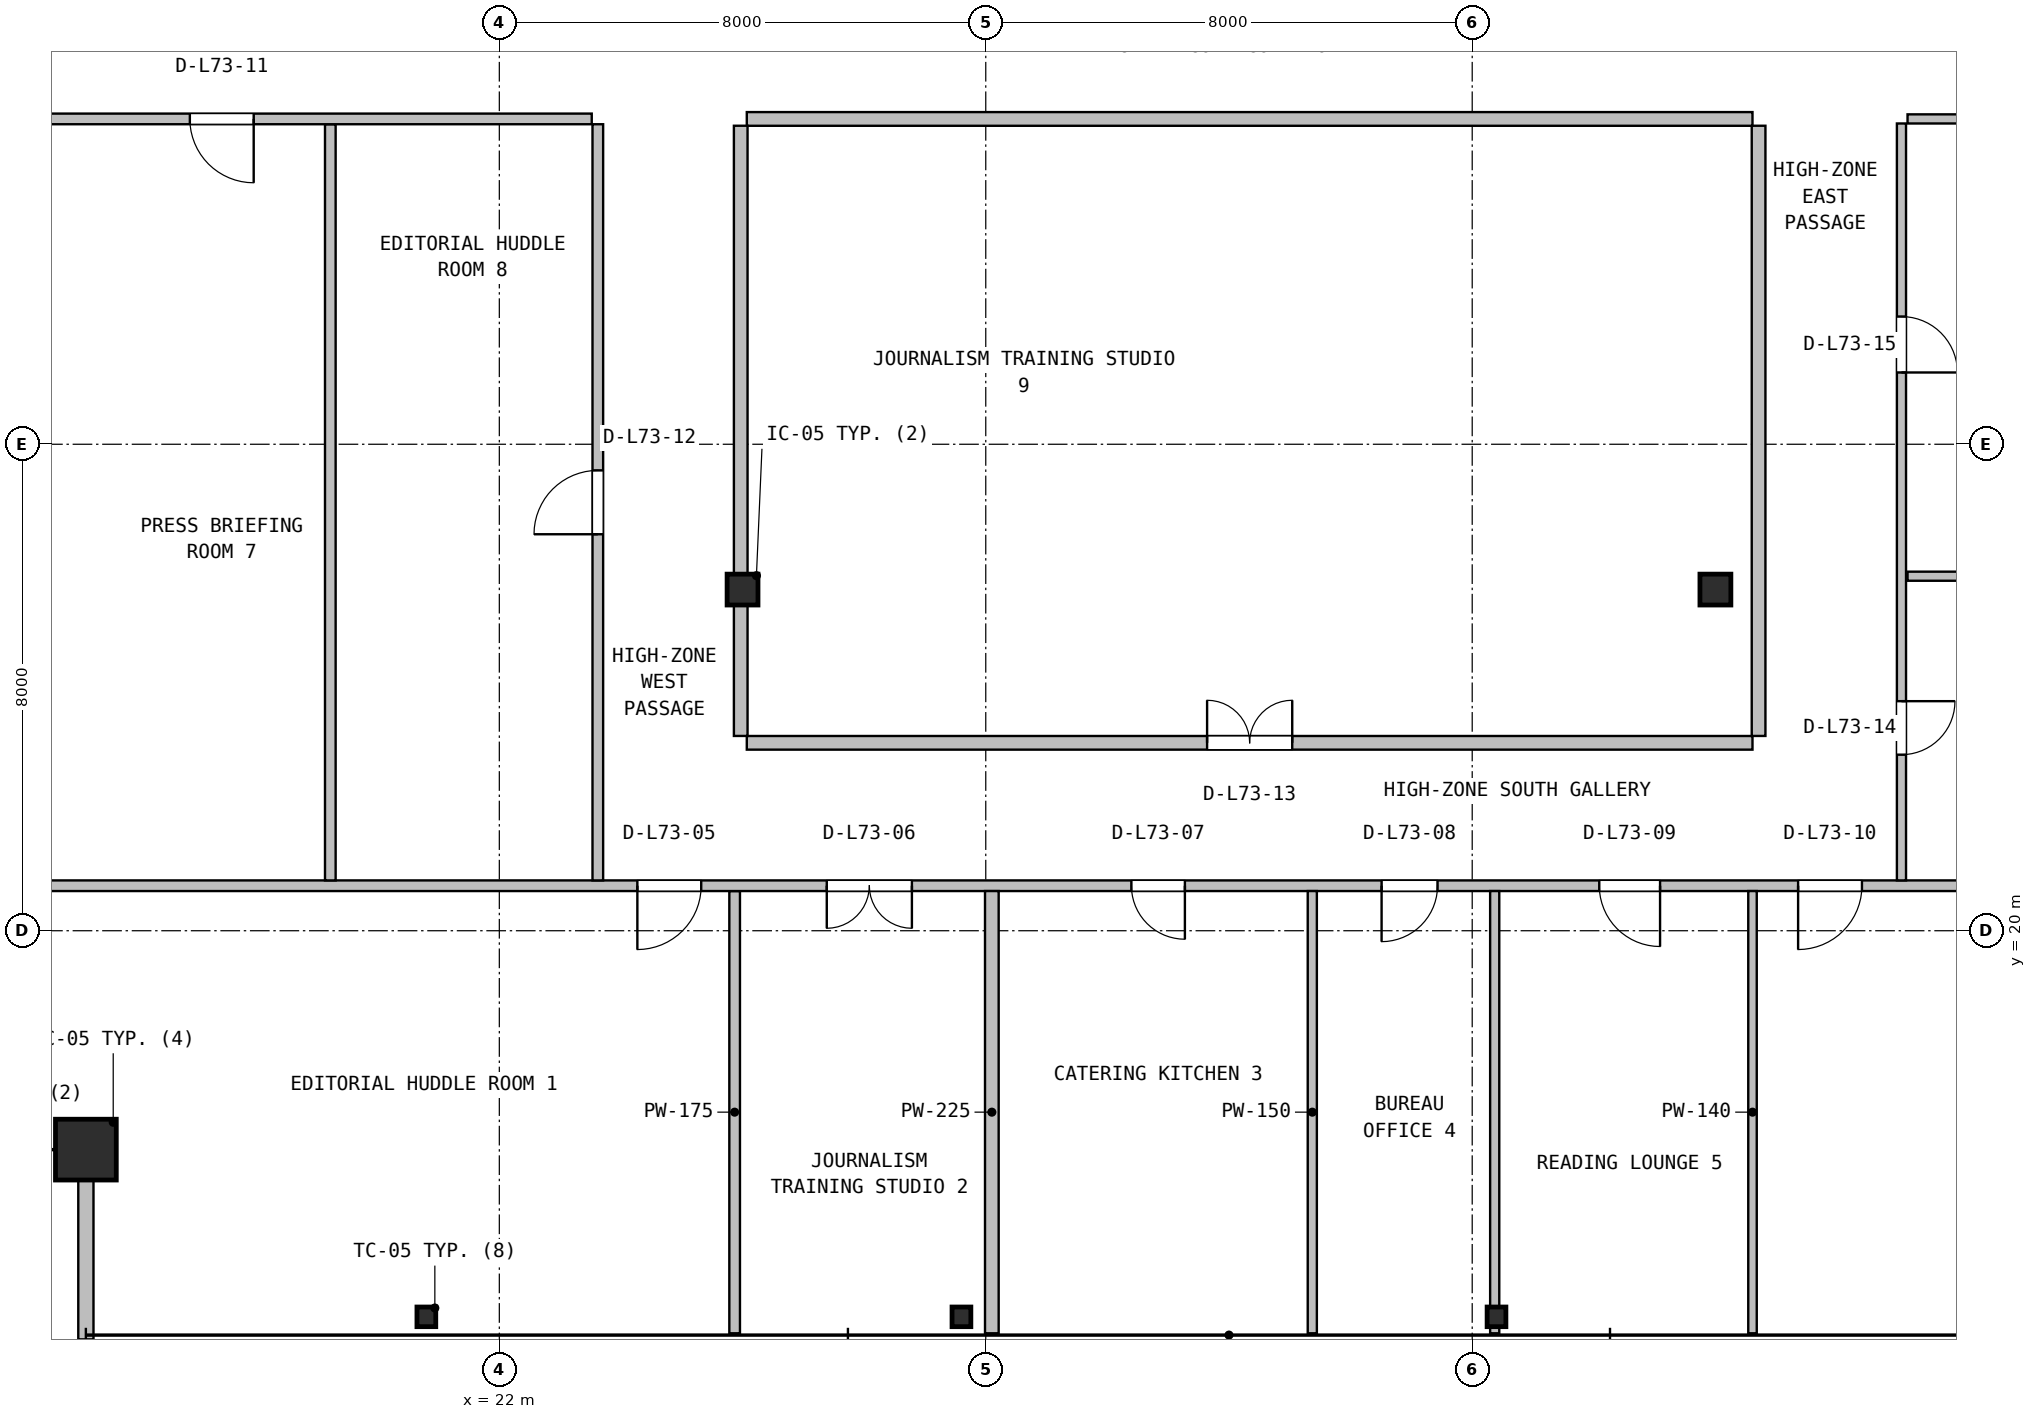
"""IFC4 building model, lengths in metres.
Left out: names, types, materials, properties, quantities, classifications, styles, units other than length and angle.
Written with IfcOpenShell. Run it as: python <this file> out.ifc"""

import sys

from ifc_helpers import new_model, si_unit, direction, frame, frame_2d, origin, origin_2d, place, context, subcontext, project, spatial, rectangle, hollow_rectangle, hollow_circle, i_section, extrude, source, transform, mapped, element, fill, save


model = new_model("IFC4")
c1 = context("Model", 3, precision=1e-05, world=origin(), true_north=direction((0.0, 1.0)))
c2 = subcontext(c1, "Body", "Model", "MODEL_VIEW")
j1 = project(units=[si_unit("LENGTHUNIT", "METRE"), si_unit("PLANEANGLEUNIT", "RADIAN")], contexts=[c1])
p1 = place(None, origin())
s1 = spatial("IfcSite", under=j1, at=p1, CompositionType="ELEMENT")
p2 = place(p1, origin())
s2 = spatial("IfcBuilding", under=s1, at=p2, CompositionType="ELEMENT")
p3 = place(p2, frame((0.0, 0.0, 292.6)))
s3 = spatial("IfcBuildingStorey", under=s2, at=p3, CompositionType="ELEMENT", Elevation=292.6)
m1 = source(origin(), c2, "Body", "SweptSolid", [
    extrude(hollow_rectangle(XDim=1.0, YDim=1.0, WallThickness=0.04, at=origin_2d()), origin(), (0.0, 0.0, 1.0), 3.8),
])
p4 = place(p3, frame((15.2, 16.4, 0.0), z_axis=(0.0, 0.0, 1.0), x_axis=(1.0, 0.0, 0.0)))
e1 = element("IfcColumn", 1, at=p4, inside=s3, PredefinedType="COLUMN", context=c2, shape_type="MappedRepresentation", body=[
    mapped(m1, transform((0.0, 0.0, 0.0), x_axis=(1.0, 0.0, 0.0), y_axis=(0.0, 1.0, 0.0), z_axis=(0.0, 0.0, 1.0), scale=1.0)),
])
m2 = source(origin(), c2, "Body", "SweptSolid", [
    extrude(i_section(OverallWidth=0.309, OverallDepth=0.323, WebThickness=0.014, FlangeThickness=0.023, FilletRadius=0.015, at=origin_2d()), origin(), (0.0, 0.0, 1.0), 3.8),
])
for number, where, z_axis, x_axis in (
    (2, (20.8, 13.65, 0.0), (0.0, 0.0, 1.0), (1.0, 0.0, 0.0)),
    (3, (29.6, 13.65, 0.0), (0.0, 0.0, 1.0), (1.0, 0.0, 0.0)),
    (4, (38.4, 13.65, 0.0), (0.0, 0.0, 1.0), (1.0, 0.0, 0.0)),
):
    element("IfcColumn", number, at=place(p3, frame(where, z_axis=z_axis, x_axis=x_axis)), inside=s3, PredefinedType="COLUMN", context=c2, shape_type="MappedRepresentation", body=[
        mapped(m2, transform((0.0, 0.0, 0.0), x_axis=(1.0, 0.0, 0.0), y_axis=(0.0, 1.0, 0.0), z_axis=(0.0, 0.0, 1.0), scale=1.0)),
    ])
m3 = source(origin(), c2, "Body", "SweptSolid", [
    extrude(hollow_circle(Radius=0.254, WallThickness=0.02, at=origin_2d()), origin(), (0.0, 0.0, 1.0), 3.8),
])
for number, where, z_axis, x_axis in (
    (5, (26.0, 25.61, 0.0), (0.0, 0.0, 1.0), (1.0, 0.0, 0.0)),
    (6, (42.0, 25.61, 0.0), (0.0, 0.0, 1.0), (1.0, 0.0, 0.0)),
):
    element("IfcColumn", number, at=place(p3, frame(where, z_axis=z_axis, x_axis=x_axis)), inside=s3, PredefinedType="COLUMN", context=c2, shape_type="MappedRepresentation", body=[
        mapped(m3, transform((0.0, 0.0, 0.0), x_axis=(1.0, 0.0, 0.0), y_axis=(0.0, 1.0, 0.0), z_axis=(0.0, 0.0, 1.0), scale=1.0)),
    ])
p5 = place(p3, frame((15.2, 13.28, 0.0), z_axis=(0.0, 0.0, 1.0), x_axis=(0.0, 1.0, 0.0)))
e7 = element("IfcWall", 7, at=p5, inside=s3, PredefinedType="SOLIDWALL", context=c2, shape_type="SweptSolid", body=[
    extrude(rectangle(XDim=3.2, YDim=0.25, at=frame_2d((1.6, 0.0))), origin(), (0.0, 0.0, 1.0), 3.171),
])
p6 = place(p3, frame((25.87, 13.38, 0.0), z_axis=(0.0, 0.0, 1.0), x_axis=(0.0, 1.0, 0.0)))
e8 = element("IfcWall", 8, at=p6, inside=s3, PredefinedType="PARTITIONING", context=c2, shape_type="SweptSolid", body=[
    extrude(rectangle(XDim=7.272, YDim=0.175, at=frame_2d((3.636, 0.0))), origin(), (0.0, 0.0, 1.0), 2.981),
])
p7 = place(p3, frame((12.18, 20.74, 0.0), z_axis=(0.0, 0.0, 1.0), x_axis=(1.0, 0.0, 0.0)))
e9 = element("IfcWall", 9, at=p7, inside=s3, PredefinedType="PARTITIONING", context=c2, shape_type="SweptSolid", body=[
    extrude(rectangle(XDim=43.64, YDim=0.175, at=frame_2d((21.82, 0.0))), origin(), (0.0, 0.0, 1.0), 2.981),
])
p8 = place(p7, frame((12.09, 0.0, 0.0)))
e10 = element("IfcOpeningElement", 10, at=p8, cuts=e9, PredefinedType="OPENING", context=c2, shape_type="SweptSolid", body=[
    extrude(rectangle(XDim=1.05, YDim=2.1, at=frame_2d((0.525, 1.05))), frame((0.0, 0.098, 0.0), z_axis=(0.0, -1.0, 0.0), x_axis=(1.0, 0.0, 0.0)), (0.0, 0.0, 1.0), 0.195),
])
p9 = place(p7, frame((15.205, 0.0, 0.0)))
e11 = element("IfcOpeningElement", 11, at=p9, cuts=e9, PredefinedType="OPENING", context=c2, shape_type="SweptSolid", body=[
    extrude(rectangle(XDim=1.4, YDim=2.12, at=frame_2d((0.7, 1.06))), frame((0.0, 0.098, 0.0), z_axis=(0.0, -1.0, 0.0), x_axis=(1.0, 0.0, 0.0)), (0.0, 0.0, 1.0), 0.195),
])
p10 = place(p7, frame((20.215, 0.0, 0.0)))
e12 = element("IfcOpeningElement", 12, at=p10, cuts=e9, PredefinedType="OPENING", context=c2, shape_type="SweptSolid", body=[
    extrude(rectangle(XDim=0.88, YDim=2.06, at=frame_2d((0.44, 1.03))), frame((0.0, 0.098, 0.0), z_axis=(0.0, -1.0, 0.0), x_axis=(1.0, 0.0, 0.0)), (0.0, 0.0, 1.0), 0.195),
])
p11 = place(p7, frame((24.33, 0.0, 0.0)))
e13 = element("IfcOpeningElement", 13, at=p11, cuts=e9, PredefinedType="OPENING", context=c2, shape_type="SweptSolid", body=[
    extrude(rectangle(XDim=0.92, YDim=2.08, at=frame_2d((0.46, 1.04))), frame((0.0, 0.098, 0.0), z_axis=(0.0, -1.0, 0.0), x_axis=(1.0, 0.0, 0.0)), (0.0, 0.0, 1.0), 0.195),
])
p12 = place(p7, frame((27.91, 0.0, 0.0)))
e14 = element("IfcOpeningElement", 14, at=p12, cuts=e9, PredefinedType="OPENING", context=c2, shape_type="SweptSolid", body=[
    extrude(rectangle(XDim=1.0, YDim=2.1, at=frame_2d((0.5, 1.05))), frame((0.0, 0.098, 0.0), z_axis=(0.0, -1.0, 0.0), x_axis=(1.0, 0.0, 0.0)), (0.0, 0.0, 1.0), 0.195),
])
p13 = place(p7, frame((31.18, 0.0, 0.0)))
e15 = element("IfcOpeningElement", 15, at=p13, cuts=e9, PredefinedType="OPENING", context=c2, shape_type="SweptSolid", body=[
    extrude(rectangle(XDim=1.05, YDim=2.1, at=frame_2d((0.525, 1.05))), frame((0.0, 0.098, 0.0), z_axis=(0.0, -1.0, 0.0), x_axis=(1.0, 0.0, 0.0)), (0.0, 0.0, 1.0), 0.195),
])
p14 = place(p3, frame((30.1, 13.38, 0.0), z_axis=(0.0, 0.0, 1.0), x_axis=(0.0, 1.0, 0.0)))
e16 = element("IfcWall", 16, at=p14, inside=s3, PredefinedType="PARTITIONING", context=c2, shape_type="SweptSolid", body=[
    extrude(rectangle(XDim=7.272, YDim=0.225, at=frame_2d((3.636, 0.0))), origin(), (0.0, 0.0, 1.0), 3.171),
])
p15 = place(p3, frame((35.37, 13.38, 0.0), z_axis=(0.0, 0.0, 1.0), x_axis=(0.0, 1.0, 0.0)))
e17 = element("IfcWall", 17, at=p15, inside=s3, PredefinedType="PARTITIONING", context=c2, shape_type="SweptSolid", body=[
    extrude(rectangle(XDim=7.272, YDim=0.15, at=frame_2d((3.636, 0.0))), origin(), (0.0, 0.0, 1.0), 3.171),
])
p16 = place(p3, frame((38.37, 13.38, 0.0), z_axis=(0.0, 0.0, 1.0), x_axis=(0.0, 1.0, 0.0)))
e18 = element("IfcWall", 18, at=p16, inside=s3, PredefinedType="PARTITIONING", context=c2, shape_type="SweptSolid", body=[
    extrude(rectangle(XDim=7.272, YDim=0.15, at=frame_2d((3.636, 0.0))), origin(), (0.0, 0.0, 1.0), 2.981),
])
p17 = place(p3, frame((42.61, 13.38, 0.0), z_axis=(0.0, 0.0, 1.0), x_axis=(0.0, 1.0, 0.0)))
e19 = element("IfcWall", 19, at=p17, inside=s3, PredefinedType="PARTITIONING", context=c2, shape_type="SweptSolid", body=[
    extrude(rectangle(XDim=7.272, YDim=0.14, at=frame_2d((3.636, 0.0))), origin(), (0.0, 0.0, 1.0), 3.171),
])
p18 = place(p3, frame((19.22, 20.827, 0.0), z_axis=(0.0, 0.0, 1.0), x_axis=(0.0, 1.0, 0.0)))
e20 = element("IfcWall", 20, at=p18, inside=s3, PredefinedType="PARTITIONING", context=c2, shape_type="SweptSolid", body=[
    extrude(rectangle(XDim=12.436, YDim=0.175, at=frame_2d((6.218, 0.0))), origin(), (0.0, 0.0, 1.0), 3.222),
])
p19 = place(p3, frame((12.18, 33.35, 0.0), z_axis=(0.0, 0.0, 1.0), x_axis=(1.0, 0.0, 0.0)))
e21 = element("IfcWall", 21, at=p19, inside=s3, PredefinedType="PARTITIONING", context=c2, shape_type="SweptSolid", body=[
    extrude(rectangle(XDim=11.34, YDim=0.175, at=frame_2d((5.67, 0.0))), origin(), (0.0, 0.0, 1.0), 3.171),
])
p20 = place(p19, frame((4.73, 0.0, 0.0)))
e22 = element("IfcOpeningElement", 22, at=p20, cuts=e21, PredefinedType="OPENING", context=c2, shape_type="SweptSolid", body=[
    extrude(rectangle(XDim=1.05, YDim=2.1, at=frame_2d((0.525, 1.05))), frame((0.0, 0.098, 0.0), z_axis=(0.0, -1.0, 0.0), x_axis=(1.0, 0.0, 0.0)), (0.0, 0.0, 1.0), 0.195),
])
p21 = place(p3, frame((23.62, 20.827, 0.0), z_axis=(0.0, 0.0, 1.0), x_axis=(0.0, 1.0, 0.0)))
e23 = element("IfcWall", 23, at=p21, inside=s3, PredefinedType="PARTITIONING", context=c2, shape_type="SweptSolid", body=[
    extrude(rectangle(XDim=12.436, YDim=0.175, at=frame_2d((6.218, 0.0))), origin(), (0.0, 0.0, 1.0), 3.222),
])
p22 = place(p21, frame((5.693, 0.0, 0.0)))
e24 = element("IfcOpeningElement", 24, at=p22, cuts=e23, PredefinedType="OPENING", context=c2, shape_type="SweptSolid", body=[
    extrude(rectangle(XDim=1.05, YDim=2.1, at=frame_2d((0.525, 1.05))), frame((0.0, 0.098, 0.0), z_axis=(0.0, -1.0, 0.0), x_axis=(1.0, 0.0, 0.0)), (0.0, 0.0, 1.0), 0.195),
])
p23 = place(p3, frame((26.07, 23.09, 0.0), z_axis=(0.0, 0.0, 1.0), x_axis=(1.0, 0.0, 0.0)))
e25 = element("IfcWall", 25, at=p23, inside=s3, PredefinedType="PARTITIONING", context=c2, shape_type="SweptSolid", body=[
    extrude(rectangle(XDim=16.54, YDim=0.225, at=frame_2d((8.27, 0.0))), origin(), (0.0, 0.0, 1.0), 2.981),
])
p24 = place(p23, frame((7.57, 0.0, 0.0)))
e26 = element("IfcOpeningElement", 26, at=p24, cuts=e25, PredefinedType="OPENING", context=c2, shape_type="SweptSolid", body=[
    extrude(rectangle(XDim=1.4, YDim=2.12, at=frame_2d((0.7, 1.06))), frame((0.0, 0.123, 0.0), z_axis=(0.0, -1.0, 0.0), x_axis=(1.0, 0.0, 0.0)), (0.0, 0.0, 1.0), 0.245),
])
p25 = place(p3, frame((42.71, 23.203, 0.0), z_axis=(0.0, 0.0, 1.0), x_axis=(0.0, 1.0, 0.0)))
e27 = element("IfcWall", 27, at=p25, inside=s3, PredefinedType="PARTITIONING", context=c2, shape_type="SweptSolid", body=[
    extrude(rectangle(XDim=10.035, YDim=0.225, at=frame_2d((5.018, 0.0))), origin(), (0.0, 0.0, 1.0), 2.981),
])
p26 = place(p3, frame((26.07, 33.35, 0.0), z_axis=(0.0, 0.0, 1.0), x_axis=(1.0, 0.0, 0.0)))
e28 = element("IfcWall", 28, at=p26, inside=s3, PredefinedType="PARTITIONING", context=c2, shape_type="SweptSolid", body=[
    extrude(rectangle(XDim=16.54, YDim=0.225, at=frame_2d((8.27, 0.0))), origin(), (0.0, 0.0, 1.0), 2.981),
])
p27 = place(p3, frame((25.97, 23.203, 0.0), z_axis=(0.0, 0.0, 1.0), x_axis=(0.0, 1.0, 0.0)))
e29 = element("IfcWall", 29, at=p27, inside=s3, PredefinedType="PARTITIONING", context=c2, shape_type="SweptSolid", body=[
    extrude(rectangle(XDim=10.035, YDim=0.225, at=frame_2d((5.018, 0.0))), origin(), (0.0, 0.0, 1.0), 2.981),
])
p28 = place(p3, frame((45.16, 25.83, 0.0), z_axis=(0.0, 0.0, 1.0), x_axis=(1.0, 0.0, 0.0)))
e30 = element("IfcWall", 30, at=p28, inside=s3, PredefinedType="PARTITIONING", context=c2, shape_type="SweptSolid", body=[
    extrude(rectangle(XDim=10.66, YDim=0.15, at=frame_2d((5.33, 0.0))), origin(), (0.0, 0.0, 1.0), 3.171),
])
p29 = place(p3, frame((45.06, 20.827, 0.0), z_axis=(0.0, 0.0, 1.0), x_axis=(0.0, 1.0, 0.0)))
e31 = element("IfcWall", 31, at=p29, inside=s3, PredefinedType="PARTITIONING", context=c2, shape_type="SweptSolid", body=[
    extrude(rectangle(XDim=12.448, YDim=0.15, at=frame_2d((6.224, 0.0))), origin(), (0.0, 0.0, 1.0), 3.222),
])
p30 = place(p29, frame((2.068, 0.0, 0.0)))
e32 = element("IfcOpeningElement", 32, at=p30, cuts=e31, PredefinedType="OPENING", context=c2, shape_type="SweptSolid", body=[
    extrude(rectangle(XDim=0.88, YDim=2.06, at=frame_2d((0.44, 1.03))), frame((0.0, 0.085, 0.0), z_axis=(0.0, -1.0, 0.0), x_axis=(1.0, 0.0, 0.0)), (0.0, 0.0, 1.0), 0.17),
])
p31 = place(p29, frame((8.353, 0.0, 0.0)))
e33 = element("IfcOpeningElement", 33, at=p31, cuts=e31, PredefinedType="OPENING", context=c2, shape_type="SweptSolid", body=[
    extrude(rectangle(XDim=0.92, YDim=2.08, at=frame_2d((0.46, 1.04))), frame((0.0, 0.085, 0.0), z_axis=(0.0, -1.0, 0.0), x_axis=(1.0, 0.0, 0.0)), (0.0, 0.0, 1.0), 0.17),
])
p32 = place(p3, frame((45.16, 33.35, 0.0), z_axis=(0.0, 0.0, 1.0), x_axis=(1.0, 0.0, 0.0)))
e34 = element("IfcWall", 34, at=p32, inside=s3, PredefinedType="PARTITIONING", context=c2, shape_type="SweptSolid", body=[
    extrude(rectangle(XDim=10.66, YDim=0.15, at=frame_2d((5.33, 0.0))), origin(), (0.0, 0.0, 1.0), 3.171),
])
m4 = source(origin(), c2, "Body", "SweptSolid", [
    extrude(rectangle(XDim=1.05, YDim=2.1, at=frame_2d((0.525, 1.05))), frame((0.0, 0.025, 0.0), z_axis=(0.0, -1.0, 0.0), x_axis=(1.0, 0.0, 0.0)), (0.0, 0.0, 1.0), 0.05),
])
p33 = place(p8, frame((1.05, 0.0, 0.0), z_axis=(0.0, 0.0, 1.0), x_axis=(-1.0, 0.0, 0.0)))
e35 = element("IfcDoor", 35, at=p33, inside=s3, OperationType="SINGLE_SWING_LEFT", PredefinedType="DOOR", context=c2, shape_type="MappedRepresentation", body=[
    mapped(m4, transform((0.0, 0.0, 0.0), x_axis=(1.0, 0.0, 0.0), y_axis=(0.0, 1.0, 0.0), z_axis=(0.0, 0.0, 1.0), scale=1.0)),
])
fill(e10, e35)
m5 = source(origin(), c2, "Body", "SweptSolid", [
    extrude(rectangle(XDim=1.4, YDim=2.12, at=frame_2d((0.7, 1.06))), frame((0.0, 0.025, 0.0), z_axis=(0.0, -1.0, 0.0), x_axis=(1.0, 0.0, 0.0)), (0.0, 0.0, 1.0), 0.05),
])
p34 = place(p9, frame((1.4, 0.0, 0.0), z_axis=(0.0, 0.0, 1.0), x_axis=(-1.0, 0.0, 0.0)))
e36 = element("IfcDoor", 36, at=p34, inside=s3, OperationType="DOUBLE_DOOR_SINGLE_SWING", PredefinedType="DOOR", context=c2, shape_type="MappedRepresentation", body=[
    mapped(m5, transform((0.0, 0.0, 0.0), x_axis=(1.0, 0.0, 0.0), y_axis=(0.0, 1.0, 0.0), z_axis=(0.0, 0.0, 1.0), scale=1.0)),
])
fill(e11, e36)
m6 = source(origin(), c2, "Body", "SweptSolid", [
    extrude(rectangle(XDim=0.88, YDim=2.06, at=frame_2d((0.44, 1.03))), frame((0.0, 0.025, 0.0), z_axis=(0.0, -1.0, 0.0), x_axis=(1.0, 0.0, 0.0)), (0.0, 0.0, 1.0), 0.05),
])
p35 = place(p10, frame((0.88, 0.0, 0.0), z_axis=(0.0, 0.0, 1.0), x_axis=(-1.0, 0.0, 0.0)))
e37 = element("IfcDoor", 37, at=p35, inside=s3, OperationType="SINGLE_SWING_RIGHT", PredefinedType="DOOR", context=c2, shape_type="MappedRepresentation", body=[
    mapped(m6, transform((0.0, 0.0, 0.0), x_axis=(1.0, 0.0, 0.0), y_axis=(0.0, 1.0, 0.0), z_axis=(0.0, 0.0, 1.0), scale=1.0)),
])
fill(e12, e37)
m7 = source(origin(), c2, "Body", "SweptSolid", [
    extrude(rectangle(XDim=0.92, YDim=2.08, at=frame_2d((0.46, 1.04))), frame((0.0, 0.025, 0.0), z_axis=(0.0, -1.0, 0.0), x_axis=(1.0, 0.0, 0.0)), (0.0, 0.0, 1.0), 0.05),
])
p36 = place(p11, frame((0.92, 0.0, 0.0), z_axis=(0.0, 0.0, 1.0), x_axis=(-1.0, 0.0, 0.0)))
e38 = element("IfcDoor", 38, at=p36, inside=s3, OperationType="SINGLE_SWING_LEFT", PredefinedType="DOOR", context=c2, shape_type="MappedRepresentation", body=[
    mapped(m7, transform((0.0, 0.0, 0.0), x_axis=(1.0, 0.0, 0.0), y_axis=(0.0, 1.0, 0.0), z_axis=(0.0, 0.0, 1.0), scale=1.0)),
])
fill(e13, e38)
m8 = source(origin(), c2, "Body", "SweptSolid", [
    extrude(rectangle(XDim=1.0, YDim=2.1, at=frame_2d((0.5, 1.05))), frame((0.0, 0.025, 0.0), z_axis=(0.0, -1.0, 0.0), x_axis=(1.0, 0.0, 0.0)), (0.0, 0.0, 1.0), 0.05),
])
p37 = place(p12, frame((1.0, 0.0, 0.0), z_axis=(0.0, 0.0, 1.0), x_axis=(-1.0, 0.0, 0.0)))
e39 = element("IfcDoor", 39, at=p37, inside=s3, OperationType="SINGLE_SWING_RIGHT", PredefinedType="DOOR", context=c2, shape_type="MappedRepresentation", body=[
    mapped(m8, transform((0.0, 0.0, 0.0), x_axis=(1.0, 0.0, 0.0), y_axis=(0.0, 1.0, 0.0), z_axis=(0.0, 0.0, 1.0), scale=1.0)),
])
fill(e14, e39)
p38 = place(p13, frame((1.05, 0.0, 0.0), z_axis=(0.0, 0.0, 1.0), x_axis=(-1.0, 0.0, 0.0)))
e40 = element("IfcDoor", 40, at=p38, inside=s3, OperationType="SINGLE_SWING_LEFT", PredefinedType="DOOR", context=c2, shape_type="MappedRepresentation", body=[
    mapped(m4, transform((0.0, 0.0, 0.0), x_axis=(1.0, 0.0, 0.0), y_axis=(0.0, 1.0, 0.0), z_axis=(0.0, 0.0, 1.0), scale=1.0)),
])
fill(e15, e40)
p39 = place(p20, frame((1.05, 0.0, 0.0), z_axis=(0.0, 0.0, 1.0), x_axis=(-1.0, 0.0, 0.0)))
e41 = element("IfcDoor", 41, at=p39, inside=s3, OperationType="SINGLE_SWING_RIGHT", PredefinedType="DOOR", context=c2, shape_type="MappedRepresentation", body=[
    mapped(m4, transform((0.0, 0.0, 0.0), x_axis=(1.0, 0.0, 0.0), y_axis=(0.0, 1.0, 0.0), z_axis=(0.0, 0.0, 1.0), scale=1.0)),
])
fill(e22, e41)
p40 = place(p22, origin())
e42 = element("IfcDoor", 42, at=p40, inside=s3, OperationType="SINGLE_SWING_LEFT", PredefinedType="DOOR", context=c2, shape_type="MappedRepresentation", body=[
    mapped(m4, transform((0.0, 0.0, 0.0), x_axis=(1.0, 0.0, 0.0), y_axis=(0.0, 1.0, 0.0), z_axis=(0.0, 0.0, 1.0), scale=1.0)),
])
fill(e24, e42)
p41 = place(p24, origin())
e43 = element("IfcDoor", 43, at=p41, inside=s3, OperationType="DOUBLE_DOOR_SINGLE_SWING", PredefinedType="DOOR", context=c2, shape_type="MappedRepresentation", body=[
    mapped(m5, transform((0.0, 0.0, 0.0), x_axis=(1.0, 0.0, 0.0), y_axis=(0.0, 1.0, 0.0), z_axis=(0.0, 0.0, 1.0), scale=1.0)),
])
fill(e26, e43)
p42 = place(p30, frame((0.88, 0.0, 0.0), z_axis=(0.0, 0.0, 1.0), x_axis=(-1.0, 0.0, 0.0)))
e44 = element("IfcDoor", 44, at=p42, inside=s3, OperationType="SINGLE_SWING_RIGHT", PredefinedType="DOOR", context=c2, shape_type="MappedRepresentation", body=[
    mapped(m6, transform((0.0, 0.0, 0.0), x_axis=(1.0, 0.0, 0.0), y_axis=(0.0, 1.0, 0.0), z_axis=(0.0, 0.0, 1.0), scale=1.0)),
])
fill(e32, e44)
p43 = place(p31, frame((0.92, 0.0, 0.0), z_axis=(0.0, 0.0, 1.0), x_axis=(-1.0, 0.0, 0.0)))
e45 = element("IfcDoor", 45, at=p43, inside=s3, OperationType="SINGLE_SWING_LEFT", PredefinedType="DOOR", context=c2, shape_type="MappedRepresentation", body=[
    mapped(m7, transform((0.0, 0.0, 0.0), x_axis=(1.0, 0.0, 0.0), y_axis=(0.0, 1.0, 0.0), z_axis=(0.0, 0.0, 1.0), scale=1.0)),
])
fill(e33, e45)
save(model, sys.argv[1])
